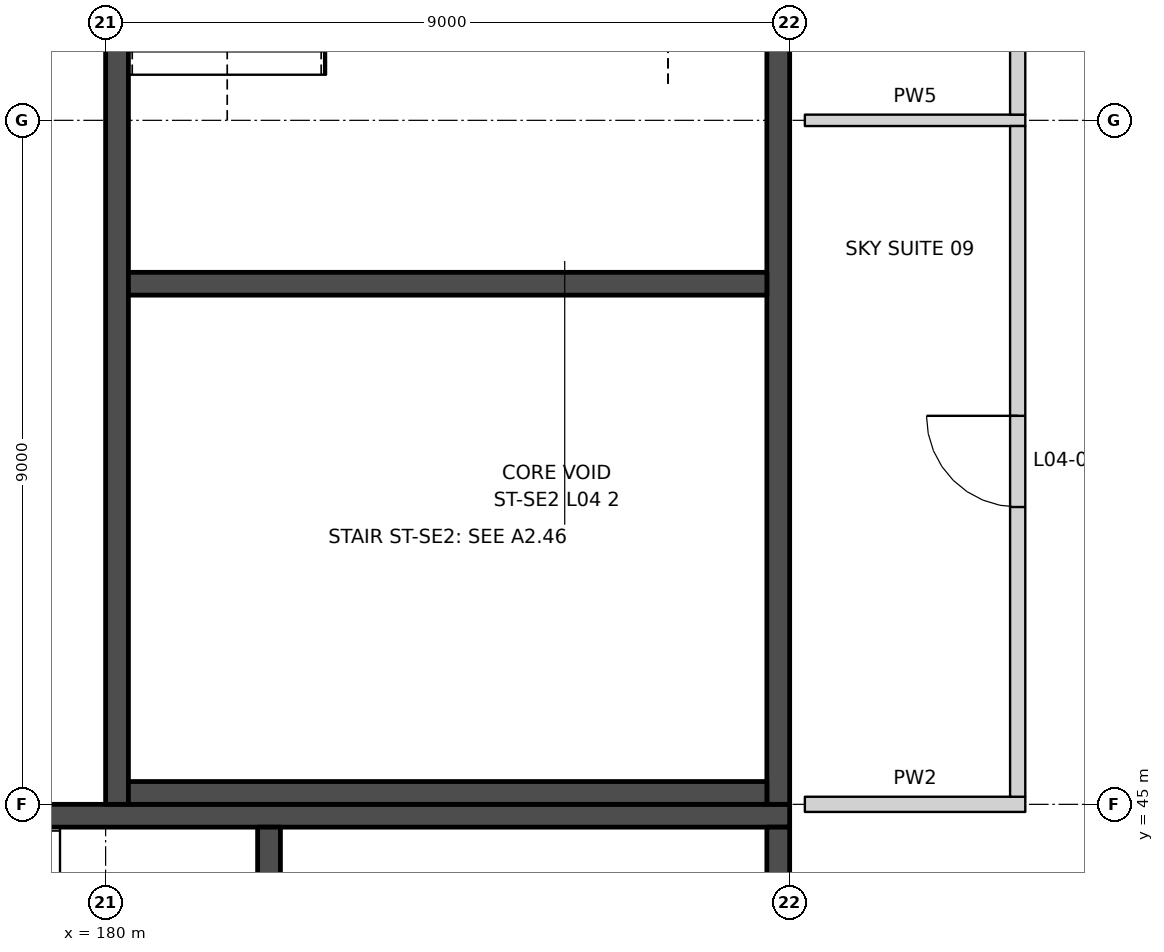
"""IFC4 building model, lengths in metres.
Left out: names, types, materials, properties, quantities, classifications, styles, units other than length and angle.
Written with IfcOpenShell. Run it as: python <this file> out.ifc"""

import sys

from ifc_helpers import new_model, si_unit, direction, frame, frame_2d, origin, place, context, subcontext, project, spatial, rectangle, extrude, element, fill, save


model = new_model("IFC4")
c1 = context("Model", 3, precision=1e-05, world=origin(), true_north=direction((0.0, 1.0)))
c2 = subcontext(c1, "Body", "Model", "MODEL_VIEW")
j1 = project(units=[si_unit("LENGTHUNIT", "METRE"), si_unit("PLANEANGLEUNIT", "RADIAN")], contexts=[c1])
p1 = place(None, origin())
s1 = spatial("IfcSite", under=j1, at=p1, CompositionType="ELEMENT")
p2 = place(p1, origin())
s2 = spatial("IfcBuilding", under=s1, at=p2, CompositionType="ELEMENT")
p3 = place(p2, frame((0.0, 0.0, 28.0)))
s3 = spatial("IfcBuildingStorey", under=s2, at=p3, CompositionType="ELEMENT", Elevation=28.0)
p4 = place(p3, frame((189.2, 45.0, 0.0), z_axis=(0.0, 0.0, 1.0), x_axis=(1.0, 0.0, 0.0)))
e1 = element("IfcWall", 1, at=p4, inside=s3, PredefinedType="PARTITIONING", context=c2, shape_type="SweptSolid", body=[
    extrude(rectangle(XDim=2.9, YDim=0.2, at=frame_2d((1.45, 0.0))), origin(), (0.0, 0.0, 1.0), 4.2),
])
p5 = place(p3, frame((189.2, 54.0, 0.0), z_axis=(0.0, 0.0, 1.0), x_axis=(1.0, 0.0, 0.0)))
e2 = element("IfcWall", 2, at=p5, inside=s3, PredefinedType="PARTITIONING", context=c2, shape_type="SweptSolid", body=[
    extrude(rectangle(XDim=2.9, YDim=0.15, at=frame_2d((1.45, 0.0))), origin(), (0.0, 0.0, 1.0), 4.2),
])
p6 = place(p3, frame((192.0, 45.1, 0.0), z_axis=(0.0, 0.0, 1.0), x_axis=(0.0, 1.0, 0.0)))
e3 = element("IfcWall", 3, at=p6, inside=s3, PredefinedType="PARTITIONING", context=c2, shape_type="SweptSolid", body=[
    extrude(rectangle(XDim=8.825, YDim=0.2, at=frame_2d((4.413, 0.0))), origin(), (0.0, 0.0, 1.0), 5.5),
])
p7 = place(p6, frame((3.812, 0.0, 0.0)))
e4 = element("IfcOpeningElement", 4, at=p7, cuts=e3, PredefinedType="OPENING", context=c2, shape_type="SweptSolid", body=[
    extrude(rectangle(XDim=1.2, YDim=2.1, at=frame_2d((0.6, 1.05))), frame((0.0, 0.11, 0.0), z_axis=(0.0, -1.0, 0.0), x_axis=(1.0, 0.0, 0.0)), (0.0, 0.0, 1.0), 0.22),
])
p8 = place(p3, frame((192.0, 54.075, 0.0), z_axis=(0.0, 0.0, 1.0), x_axis=(0.0, 1.0, 0.0)))
e5 = element("IfcWall", 5, at=p8, inside=s3, PredefinedType="PARTITIONING", context=c2, shape_type="SweptSolid", body=[
    extrude(rectangle(XDim=8.85, YDim=0.2, at=frame_2d((4.425, 0.0))), origin(), (0.0, 0.0, 1.0), 5.5),
])
p9 = place(p8, frame((3.825, 0.0, 0.0)))
e6 = element("IfcOpeningElement", 6, at=p9, cuts=e5, PredefinedType="OPENING", context=c2, shape_type="SweptSolid", body=[
    extrude(rectangle(XDim=1.2, YDim=2.1, at=frame_2d((0.6, 1.05))), frame((0.0, 0.11, 0.0), z_axis=(0.0, -1.0, 0.0), x_axis=(1.0, 0.0, 0.0)), (0.0, 0.0, 1.0), 0.22),
])
p10 = place(p3, frame((171.0, 44.85, 0.0), z_axis=(0.0, 0.0, 1.0), x_axis=(1.0, 0.0, 0.0)))
e7 = element("IfcWall", 7, at=p10, inside=s3, PredefinedType="SHEAR", context=c2, shape_type="SweptSolid", body=[
    extrude(rectangle(XDim=18.0, YDim=0.3, at=frame_2d((9.0, 0.0))), origin(), (0.0, 0.0, 1.0), 5.5),
])
p11 = place(p10, frame((1.5, 0.0, 0.0)))
e8 = element("IfcOpeningElement", 8, at=p11, cuts=e7, PredefinedType="OPENING", context=c2, shape_type="SweptSolid", body=[
    extrude(rectangle(XDim=1.2, YDim=2.1, at=frame_2d((0.6, 1.05))), frame((0.0, 0.16, 0.0), z_axis=(0.0, -1.0, 0.0), x_axis=(1.0, 0.0, 0.0)), (0.0, 0.0, 1.0), 0.32),
])
for number, where, z_axis, x_axis in (
    (9, (188.85, 44.7, 0.0), (0.0, 0.0, 1.0), (0.0, -1.0, 0.0)),
    (10, (182.15, 44.7, 0.0), (0.0, 0.0, 1.0), (0.0, -1.0, 0.0)),
):
    element("IfcWall", number, at=place(p3, frame(where, z_axis=z_axis, x_axis=x_axis)), inside=s3, PredefinedType="SHEAR", context=c2, shape_type="SweptSolid", body=[
        extrude(rectangle(XDim=8.4, YDim=0.3, at=frame_2d((4.2, 0.0))), origin(), (0.0, 0.0, 1.0), 5.5),
    ])
p12 = place(p3, frame((180.15, 63.0, 0.0), z_axis=(0.0, 0.0, 1.0), x_axis=(0.0, -1.0, 0.0)))
e11 = element("IfcWall", 11, at=p12, inside=s3, PredefinedType="SHEAR", context=c2, shape_type="SweptSolid", body=[
    extrude(rectangle(XDim=18.0, YDim=0.3, at=frame_2d((9.0, 0.0))), origin(), (0.0, 0.0, 1.0), 5.5),
])
p13 = place(p12, frame((1.5, 0.0, 0.0)))
e12 = element("IfcOpeningElement", 12, at=p13, cuts=e11, PredefinedType="OPENING", context=c2, shape_type="SweptSolid", body=[
    extrude(rectangle(XDim=1.2, YDim=2.1, at=frame_2d((0.6, 1.05))), frame((0.0, 0.16, 0.0), z_axis=(0.0, -1.0, 0.0), x_axis=(1.0, 0.0, 0.0)), (0.0, 0.0, 1.0), 0.32),
])
p14 = place(p3, frame((188.85, 63.0, 0.0), z_axis=(0.0, 0.0, 1.0), x_axis=(0.0, -1.0, 0.0)))
e13 = element("IfcWall", 13, at=p14, inside=s3, PredefinedType="SHEAR", context=c2, shape_type="SweptSolid", body=[
    extrude(rectangle(XDim=18.0, YDim=0.3, at=frame_2d((9.0, 0.0))), origin(), (0.0, 0.0, 1.0), 5.5),
])
for number, where, z_axis, x_axis in (
    (14, (180.3, 45.15, 0.0), (0.0, 0.0, 1.0), (1.0, 0.0, 0.0)),
    (15, (180.3, 51.85, 0.0), (0.0, 0.0, 1.0), (1.0, 0.0, 0.0)),
):
    element("IfcWall", number, at=place(p3, frame(where, z_axis=z_axis, x_axis=x_axis)), inside=s3, PredefinedType="SHEAR", context=c2, shape_type="SweptSolid", body=[
        extrude(rectangle(XDim=8.4, YDim=0.3, at=frame_2d((4.2, 0.0))), origin(), (0.0, 0.0, 1.0), 5.5),
    ])
p15 = place(p7, origin())
e16 = element("IfcDoor", 16, at=p15, inside=s3, OperationType="SINGLE_SWING_RIGHT", PredefinedType="DOOR", context=c2, shape_type="SweptSolid", body=[
    extrude(rectangle(XDim=1.2, YDim=2.1, at=frame_2d((0.6, 1.05))), frame((0.0, 0.025, 0.0), z_axis=(0.0, -1.0, 0.0), x_axis=(1.0, 0.0, 0.0)), (0.0, 0.0, 1.0), 0.05),
])
fill(e4, e16)
save(model, sys.argv[1])
